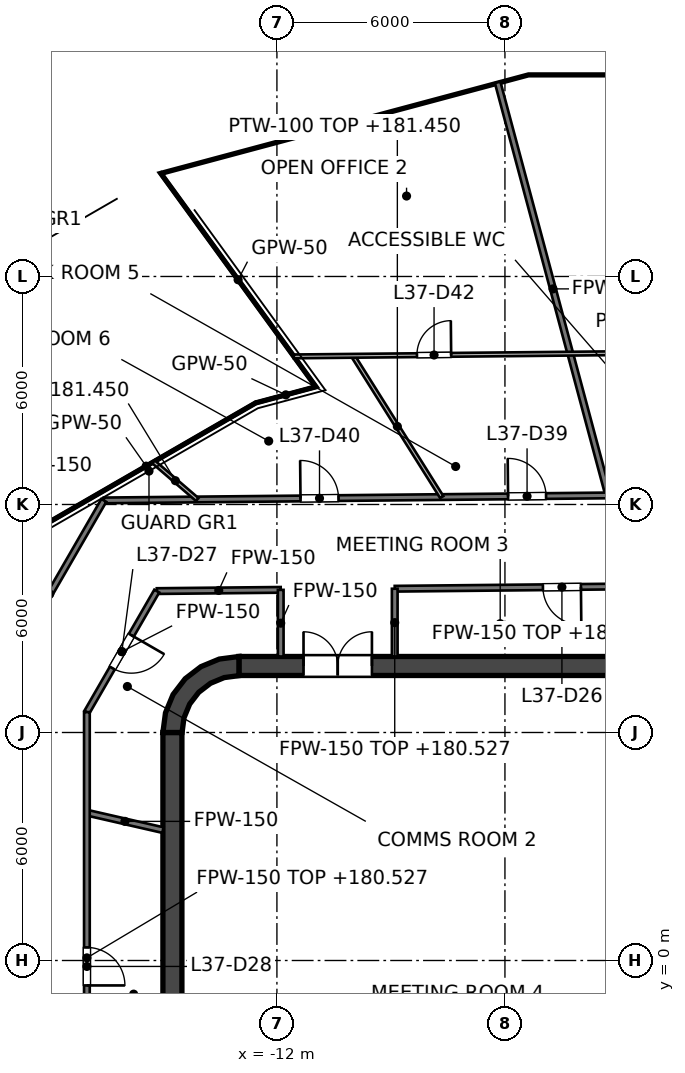
"""IFC4 building model, lengths in metres.
Left out: names, types, materials, properties, quantities, classifications, styles, units other than length and angle.
Written with IfcOpenShell. Run it as: python <this file> out.ifc"""

import sys

from ifc_helpers import new_model, si_unit, direction, frame, frame_2d, origin, place, context, subcontext, project, spatial, polyline, rectangle, outline, extrude, element, fill, save


model = new_model("IFC4")
c1 = context("Model", 3, precision=1e-05, world=origin(), true_north=direction((0.0, 1.0)))
c2 = subcontext(c1, "Body", "Model", "MODEL_VIEW")
j1 = project(units=[si_unit("LENGTHUNIT", "METRE"), si_unit("PLANEANGLEUNIT", "RADIAN")], contexts=[c1])
p1 = place(None, origin())
s1 = spatial("IfcSite", under=j1, at=p1, CompositionType="ELEMENT")
p2 = place(p1, origin())
s2 = spatial("IfcBuilding", under=s1, at=p2, CompositionType="ELEMENT")
p3 = place(p2, frame((0.0, 0.0, 177.6)))
s3 = spatial("IfcBuildingStorey", under=s2, at=p3, CompositionType="ELEMENT", Elevation=177.6)
p4 = place(p3, frame((-13.0, 7.75, 0.0), z_axis=(0.0, 0.0, 1.0), x_axis=(1.0, 0.0, 0.0)))
e1 = element("IfcWall", 1, at=p4, inside=s3, PredefinedType="SHEAR", context=c2, shape_type="SweptSolid", body=[
    extrude(rectangle(XDim=26.0, YDim=0.5, at=frame_2d((13.0, 0.0))), origin(), (0.0, 0.0, 1.0), 4.0),
])
p5 = place(p4, frame((1.7, 0.0, 0.0)))
e2 = element("IfcOpeningElement", 2, at=p5, cuts=e1, PredefinedType="OPENING", context=c2, shape_type="SweptSolid", body=[
    extrude(rectangle(XDim=1.8, YDim=2.1, at=frame_2d((0.9, 1.05))), frame((0.0, 0.25, 0.0), z_axis=(0.0, -1.0, 0.0), x_axis=(1.0, 0.0, 0.0)), (0.0, 0.0, 1.0), 0.5),
])
p6 = place(p4, frame((22.5, 0.0, 0.0)))
e3 = element("IfcOpeningElement", 3, at=p6, cuts=e1, PredefinedType="OPENING", context=c2, shape_type="SweptSolid", body=[
    extrude(rectangle(XDim=1.8, YDim=2.1, at=frame_2d((0.9, 1.05))), frame((0.0, 0.25, 0.0), z_axis=(0.0, -1.0, 0.0), x_axis=(1.0, 0.0, 0.0)), (0.0, 0.0, 1.0), 0.5),
])
p7 = place(p3, frame((-14.75, -6.0, 0.0), z_axis=(0.0, 0.0, 1.0), x_axis=(0.0, 1.0, 0.0)))
e4 = element("IfcWall", 4, at=p7, inside=s3, PredefinedType="SHEAR", context=c2, shape_type="SweptSolid", body=[
    extrude(rectangle(XDim=12.0, YDim=0.5, at=frame_2d((6.0, 0.0))), origin(), (0.0, 0.0, 1.0), 4.0),
])
p8 = place(p3, origin())
e5 = element("IfcWall", 5, at=p8, inside=s3, PredefinedType="SHEAR", context=c2, shape_type="SweptSolid", body=[
    extrude(outline(polyline([(-15.0, 6.0), (-14.496, 6.0), (-14.445, 6.387), (-14.295, 6.748), (-14.058, 7.058), (-13.748, 7.295), (-13.387, 7.445), (-13.0, 7.496), (-13.0, 8.0), (-13.518, 7.932), (-14.0, 7.732), (-14.414, 7.414), (-14.732, 7.0), (-14.932, 6.518), (-15.0, 6.0)])), origin(), (0.0, 0.0, 1.0), 4.0),
])
p9 = place(p3, frame((-9.0, 4.1, 0.0), z_axis=(0.0, 0.0, 1.0), x_axis=(0.0, 1.0, 0.0)))
e6 = element("IfcWall", 6, at=p9, inside=s3, PredefinedType="SOLIDWALL", context=c2, shape_type="SweptSolid", body=[
    extrude(rectangle(XDim=2.5, YDim=0.25, at=frame_2d((1.25, 0.0))), origin(), (0.0, 0.0, 1.0), 3.85),
])
p10 = place(p9, frame((0.65, 0.0, 0.0)))
e7 = element("IfcOpeningElement", 7, at=p10, cuts=e6, PredefinedType="OPENING", context=c2, shape_type="SweptSolid", body=[
    extrude(rectangle(XDim=1.2, YDim=2.1, at=frame_2d((0.6, 1.05))), frame((0.0, 0.125, 0.0), z_axis=(0.0, -1.0, 0.0), x_axis=(1.0, 0.0, 0.0)), (0.0, 0.0, 1.0), 0.25),
])
p11 = place(p3, frame((-9.125, 7.05, 0.0), z_axis=(0.0, 0.0, 1.0), x_axis=(1.0, 0.0, 0.0)))
e8 = element("IfcWall", 8, at=p11, inside=s3, PredefinedType="SOLIDWALL", context=c2, shape_type="SweptSolid", body=[
    extrude(rectangle(XDim=18.25, YDim=0.9, at=frame_2d((9.125, 0.0))), origin(), (0.0, 0.0, 1.0), 3.85),
])
p12 = place(p3, frame((-9.125, 1.525, 0.0), z_axis=(0.0, 0.0, 1.0), x_axis=(1.0, 0.0, 0.0)))
e9 = element("IfcWall", 9, at=p12, inside=s3, PredefinedType="PARTITIONING", context=c2, shape_type="SweptSolid", body=[
    extrude(rectangle(XDim=8.35, YDim=0.25, at=frame_2d((4.175, 0.0))), origin(), (0.0, 0.0, 1.0), 3.85),
])
p13 = place(p12, frame((1.363, 0.0, 0.0)))
e10 = element("IfcOpeningElement", 10, at=p13, cuts=e9, PredefinedType="OPENING", context=c2, shape_type="SweptSolid", body=[
    extrude(rectangle(XDim=1.0, YDim=2.1, at=frame_2d((0.5, 1.05))), frame((0.0, 0.125, 0.0), z_axis=(0.0, -1.0, 0.0), x_axis=(1.0, 0.0, 0.0)), (0.0, 0.0, 1.0), 0.25),
])
p14 = place(p12, frame((5.337, 0.0, 0.0)))
e11 = element("IfcOpeningElement", 11, at=p14, cuts=e9, PredefinedType="OPENING", context=c2, shape_type="SweptSolid", body=[
    extrude(rectangle(XDim=1.0, YDim=2.1, at=frame_2d((0.5, 1.05))), frame((0.0, 0.125, 0.0), z_axis=(0.0, -1.0, 0.0), x_axis=(1.0, 0.0, 0.0)), (0.0, 0.0, 1.0), 0.25),
])
p15 = place(p3, frame((-9.125, 3.975, 0.0), z_axis=(0.0, 0.0, 1.0), x_axis=(1.0, 0.0, 0.0)))
e12 = element("IfcWall", 12, at=p15, inside=s3, PredefinedType="SOLIDWALL", context=c2, shape_type="SweptSolid", body=[
    extrude(rectangle(XDim=8.35, YDim=0.25, at=frame_2d((4.175, 0.0))), origin(), (0.0, 0.0, 1.0), 3.85),
])
p16 = place(p3, frame((-9.0, 1.65, 0.0), z_axis=(0.0, 0.0, 1.0), x_axis=(0.0, 1.0, 0.0)))
e13 = element("IfcWall", 13, at=p16, inside=s3, PredefinedType="PARTITIONING", context=c2, shape_type="SweptSolid", body=[
    extrude(rectangle(XDim=2.2, YDim=0.25, at=frame_2d((1.1, 0.0))), origin(), (0.0, 0.0, 1.0), 3.85),
])
p17 = place(p3, frame((-5.6, 1.65, 0.0), z_axis=(0.0, 0.0, 1.0), x_axis=(0.0, 1.0, 0.0)))
e14 = element("IfcWall", 14, at=p17, inside=s3, PredefinedType="PARTITIONING", context=c2, shape_type="SweptSolid", body=[
    extrude(rectangle(XDim=2.2, YDim=0.1, at=frame_2d((1.1, 0.0))), origin(), (0.0, 0.0, 1.0), 3.85),
])
p18 = place(p3, frame((-11.8, -7.5, 0.0), z_axis=(0.0, 0.0, 1.0), x_axis=(0.0, 1.0, 0.0)))
e15 = element("IfcWall", 15, at=p18, inside=s3, PredefinedType="SOLIDWALL", context=c2, shape_type="SweptSolid", body=[
    extrude(rectangle(XDim=15.0, YDim=0.4, at=frame_2d((7.5, 0.0))), origin(), (0.0, 0.0, 1.0), 3.85),
])
p19 = place(p18, frame((11.3, 0.0, 0.0)))
e16 = element("IfcOpeningElement", 16, at=p19, cuts=e15, PredefinedType="OPENING", context=c2, shape_type="SweptSolid", body=[
    extrude(rectangle(XDim=1.1, YDim=2.1, at=frame_2d((0.55, 1.05))), frame((0.0, 0.2, 0.0), z_axis=(0.0, -1.0, 0.0), x_axis=(1.0, 0.0, 0.0)), (0.0, 0.0, 1.0), 0.4),
])
p20 = place(p18, frame((8.4, 0.0, 0.0)))
e17 = element("IfcOpeningElement", 17, at=p20, cuts=e15, PredefinedType="OPENING", context=c2, shape_type="SweptSolid", body=[
    extrude(rectangle(XDim=1.1, YDim=2.1, at=frame_2d((0.55, 1.05))), frame((0.0, 0.2, 0.0), z_axis=(0.0, -1.0, 0.0), x_axis=(1.0, 0.0, 0.0)), (0.0, 0.0, 1.0), 0.4),
])
p21 = place(p18, frame((5.5, 0.0, 0.0)))
e18 = element("IfcOpeningElement", 18, at=p21, cuts=e15, PredefinedType="OPENING", context=c2, shape_type="SweptSolid", body=[
    extrude(rectangle(XDim=1.1, YDim=2.1, at=frame_2d((0.55, 1.05))), frame((0.0, 0.2, 0.0), z_axis=(0.0, -1.0, 0.0), x_axis=(1.0, 0.0, 0.0)), (0.0, 0.0, 1.0), 0.4),
])
p22 = place(p18, frame((13.697, 0.0, 0.0)))
e19 = element("IfcOpeningElement", 19, at=p22, cuts=e15, PredefinedType="OPENING", context=c2, shape_type="SweptSolid", body=[
    extrude(rectangle(XDim=0.9, YDim=2.1, at=frame_2d((0.45, 1.05))), frame((0.0, 0.2, 0.0), z_axis=(0.0, -1.0, 0.0), x_axis=(1.0, 0.0, 0.0)), (0.0, 0.0, 1.0), 0.4),
])
p23 = place(p18, frame((0.403, 0.0, 0.0)))
e20 = element("IfcOpeningElement", 20, at=p23, cuts=e15, PredefinedType="OPENING", context=c2, shape_type="SweptSolid", body=[
    extrude(rectangle(XDim=0.9, YDim=2.1, at=frame_2d((0.45, 1.05))), frame((0.0, 0.2, 0.0), z_axis=(0.0, -1.0, 0.0), x_axis=(1.0, 0.0, 0.0)), (0.0, 0.0, 1.0), 0.4),
])
e21 = element("IfcWall", 21, at=p8, inside=s3, PredefinedType="SOLIDWALL", context=c2, shape_type="SweptSolid", body=[
    extrude(outline(polyline([(-12.0, -5.925), (-12.0, -5.675), (-14.25, -5.675), (-14.25, -3.025), (-12.0, -3.025), (-12.0, -2.775), (-14.25, -2.775), (-14.25, -0.125), (-12.0, -0.125), (-12.0, 0.125), (-14.25, 0.125), (-14.25, 2.775), (-12.0, 2.775), (-12.0, 3.025), (-14.25, 3.025), (-14.25, 5.675), (-12.0, 5.675), (-12.0, 5.925), (-14.25, 5.925), (-14.5, 5.925), (-14.5, 5.675), (-14.5, 3.025), (-14.5, 2.775), (-14.5, 0.125), (-14.5, -0.125), (-14.5, -2.775), (-14.5, -3.025), (-14.5, -5.675), (-14.5, -5.925), (-14.25, -5.925), (-12.0, -5.925)])), origin(), (0.0, 0.0, 1.0), 3.85),
])
p24 = place(p3, frame((-6.192, 23.108, 0.0), z_axis=(0.0, 0.0, 1.0), x_axis=(0.258761752607, -0.965941175946, 0.0)))
e22 = element("IfcWall", 22, at=p24, inside=s3, PredefinedType="PARTITIONING", context=c2, shape_type="SweptSolid", body=[
    extrude(rectangle(XDim=11.252, YDim=0.15, at=frame_2d((5.626, 0.0))), origin(), (0.0, 0.0, 1.0), 3.302),
])
p25 = place(p3, frame((-17.0, 3.89, 0.0), z_axis=(0.0, 0.0, 1.0), x_axis=(0.974792736312, -0.223112351146, 0.0)))
e23 = element("IfcWall", 23, at=p25, inside=s3, PredefinedType="PARTITIONING", context=c2, shape_type="SweptSolid", body=[
    extrude(rectangle(XDim=2.052, YDim=0.15, at=frame_2d((1.026, 0.0))), origin(), (0.0, 0.0, 1.0), 2.995),
])
p26 = place(p3, frame((-15.161, 9.721, 0.0), z_axis=(0.0, 0.0, 1.0), x_axis=(0.999950429518, 0.009956832157, 0.0)))
e24 = element("IfcWall", 24, at=p26, inside=s3, PredefinedType="PARTITIONING", context=c2, shape_type="SweptSolid", body=[
    extrude(rectangle(XDim=3.261, YDim=0.15, at=frame_2d((1.631, 0.0))), origin(), (0.0, 0.0, 1.0), 2.995),
])
p27 = place(p3, frame((-8.9, 9.783, 0.0), z_axis=(0.0, 0.0, 1.0), x_axis=(0.999950969978, 0.009902405776, 0.0)))
e25 = element("IfcWall", 25, at=p27, inside=s3, PredefinedType="PARTITIONING", context=c2, shape_type="SweptSolid", body=[
    extrude(rectangle(XDim=17.801, YDim=0.15, at=frame_2d((8.9, 0.0))), origin(), (0.0, 0.0, 1.0), 2.927),
])
p28 = place(p27, frame((12.801, 0.0, 0.0)))
e26 = element("IfcOpeningElement", 26, at=p28, cuts=e25, PredefinedType="OPENING", context=c2, shape_type="SweptSolid", body=[
    extrude(rectangle(XDim=1.0, YDim=2.1, at=frame_2d((0.5, 1.05))), frame((0.0, 0.075, 0.0), z_axis=(0.0, -1.0, 0.0), x_axis=(1.0, 0.0, 0.0)), (0.0, 0.0, 1.0), 0.15),
])
p29 = place(p27, frame((3.9, 0.0, 0.0)))
e27 = element("IfcOpeningElement", 27, at=p29, cuts=e25, PredefinedType="OPENING", context=c2, shape_type="SweptSolid", body=[
    extrude(rectangle(XDim=1.0, YDim=2.1, at=frame_2d((0.5, 1.05))), frame((0.0, 0.075, 0.0), z_axis=(0.0, -1.0, 0.0), x_axis=(1.0, 0.0, 0.0)), (0.0, 0.0, 1.0), 0.15),
])
p30 = place(p3, frame((-16.555, 12.107, 0.0), z_axis=(0.0, 0.0, 1.0), x_axis=(0.999951034758, 0.009895862121, 0.0)))
e28 = element("IfcWall", 28, at=p30, inside=s3, PredefinedType="PARTITIONING", context=c2, shape_type="SweptSolid", body=[
    extrude(rectangle(XDim=30.715, YDim=0.15, at=frame_2d((15.358, 0.0))), origin(), (0.0, 0.0, 1.0), 2.927),
])
p31 = place(p30, frame((20.689, 0.0, 0.0)))
e29 = element("IfcOpeningElement", 29, at=p31, cuts=e28, PredefinedType="OPENING", context=c2, shape_type="SweptSolid", body=[
    extrude(rectangle(XDim=1.0, YDim=2.1, at=frame_2d((0.5, 1.05))), frame((0.0, 0.075, 0.0), z_axis=(0.0, -1.0, 0.0), x_axis=(1.0, 0.0, 0.0)), (0.0, 0.0, 1.0), 0.15),
])
p32 = place(p30, frame((14.115, 0.0, 0.0)))
e30 = element("IfcOpeningElement", 30, at=p32, cuts=e28, PredefinedType="OPENING", context=c2, shape_type="SweptSolid", body=[
    extrude(rectangle(XDim=1.0, YDim=2.1, at=frame_2d((0.5, 1.05))), frame((0.0, 0.075, 0.0), z_axis=(0.0, -1.0, 0.0), x_axis=(1.0, 0.0, 0.0)), (0.0, 0.0, 1.0), 0.15),
])
p33 = place(p30, frame((10.638, 0.0, 0.0)))
e31 = element("IfcOpeningElement", 31, at=p33, cuts=e28, PredefinedType="OPENING", context=c2, shape_type="SweptSolid", body=[
    extrude(rectangle(XDim=1.0, YDim=2.1, at=frame_2d((0.5, 1.05))), frame((0.0, 0.075, 0.0), z_axis=(0.0, -1.0, 0.0), x_axis=(1.0, 0.0, 0.0)), (0.0, 0.0, 1.0), 0.15),
])
p34 = place(p30, frame((5.176, 0.0, 0.0)))
e32 = element("IfcOpeningElement", 32, at=p34, cuts=e28, PredefinedType="OPENING", context=c2, shape_type="SweptSolid", body=[
    extrude(rectangle(XDim=1.0, YDim=2.1, at=frame_2d((0.5, 1.05))), frame((0.0, 0.075, 0.0), z_axis=(0.0, -1.0, 0.0), x_axis=(1.0, 0.0, 0.0)), (0.0, 0.0, 1.0), 0.15),
])
p35 = place(p3, frame((-17.0, 6.536, 0.0), z_axis=(0.0, 0.0, 1.0), x_axis=(0.499965700209, 0.866045205872, 0.0)))
e33 = element("IfcWall", 33, at=p35, inside=s3, PredefinedType="PARTITIONING", context=c2, shape_type="SweptSolid", body=[
    extrude(rectangle(XDim=3.678, YDim=0.15, at=frame_2d((1.839, 0.0))), origin(), (0.0, 0.0, 1.0), 2.995),
])
p36 = place(p35, frame((1.338, 0.0, 0.0)))
e34 = element("IfcOpeningElement", 34, at=p36, cuts=e33, PredefinedType="OPENING", context=c2, shape_type="SweptSolid", body=[
    extrude(rectangle(XDim=1.0, YDim=2.1, at=frame_2d((0.5, 1.05))), frame((0.0, 0.075, 0.0), z_axis=(0.0, -1.0, 0.0), x_axis=(1.0, 0.0, 0.0)), (0.0, 0.0, 1.0), 0.15),
])
p37 = place(p3, frame((-19.4, 7.179, 0.0), z_axis=(0.0, 0.0, 1.0), x_axis=(0.499973768087, 0.866040548257, 0.0)))
e35 = element("IfcWall", 35, at=p37, inside=s3, PredefinedType="PARTITIONING", context=c2, shape_type="SweptSolid", body=[
    extrude(rectangle(XDim=5.69, YDim=0.15, at=frame_2d((2.845, 0.0))), origin(), (0.0, 0.0, 1.0), 2.995),
])
p38 = place(p37, frame((1.73, 0.0, 0.0)))
e36 = element("IfcOpeningElement", 36, at=p38, cuts=e35, PredefinedType="OPENING", context=c2, shape_type="SweptSolid", body=[
    extrude(rectangle(XDim=1.0, YDim=2.1, at=frame_2d((0.5, 1.05))), frame((0.0, 0.075, 0.0), z_axis=(0.0, -1.0, 0.0), x_axis=(1.0, 0.0, 0.0)), (0.0, 0.0, 1.0), 0.15),
])
p39 = place(p3, frame((-8.9, 8.0, 0.0), z_axis=(0.0, 0.0, 1.0), x_axis=(0.0, 1.0, 0.0)))
e37 = element("IfcWall", 37, at=p39, inside=s3, PredefinedType="PARTITIONING", context=c2, shape_type="SweptSolid", body=[
    extrude(rectangle(XDim=1.783, YDim=0.15, at=frame_2d((0.892, 0.0))), origin(), (0.0, 0.0, 1.0), 2.927),
])
p40 = place(p3, frame((-11.9, 8.0, 0.0), z_axis=(0.0, 0.0, 1.0), x_axis=(0.0, 1.0, 0.0)))
e38 = element("IfcWall", 38, at=p40, inside=s3, PredefinedType="PARTITIONING", context=c2, shape_type="SweptSolid", body=[
    extrude(rectangle(XDim=1.753, YDim=0.15, at=frame_2d((0.876, 0.0))), origin(), (0.0, 0.0, 1.0), 2.995),
])
p41 = place(p3, frame((-17.0, -6.398, 0.0), z_axis=(0.0, 0.0, 1.0), x_axis=(0.0, 1.0, 0.0)))
e39 = element("IfcWall", 39, at=p41, inside=s3, PredefinedType="PARTITIONING", context=c2, shape_type="SweptSolid", body=[
    extrude(rectangle(XDim=12.934, YDim=0.15, at=frame_2d((6.467, 0.0))), origin(), (0.0, 0.0, 1.0), 2.927),
])
p42 = place(p41, frame((5.742, 0.0, 0.0)))
e40 = element("IfcOpeningElement", 40, at=p42, cuts=e39, PredefinedType="OPENING", context=c2, shape_type="SweptSolid", body=[
    extrude(rectangle(XDim=1.0, YDim=2.1, at=frame_2d((0.5, 1.05))), frame((0.0, 0.075, 0.0), z_axis=(0.0, -1.0, 0.0), x_axis=(1.0, 0.0, 0.0)), (0.0, 0.0, 1.0), 0.15),
])
p43 = place(p3, frame((-15.068, 20.73, 0.0), z_axis=(0.0, 0.0, 1.0), x_axis=(0.587950705029, -0.808896760073, 0.0)))
e41 = element("IfcWall", 41, at=p43, inside=s3, PredefinedType="PARTITIONING", context=c2, shape_type="SweptSolid", body=[
    extrude(rectangle(XDim=6.964, YDim=0.05, at=frame_2d((3.482, 0.0))), origin(), (0.0, 0.0, 1.0), 2.927),
])
p44 = place(p3, frame((-12.559, 14.673, 0.0), z_axis=(0.0, 0.0, 1.0), x_axis=(0.966056881693, 0.25832944341, 0.0)))
e42 = element("IfcWall", 42, at=p44, inside=s3, PredefinedType="PARTITIONING", context=c2, shape_type="SweptSolid", body=[
    extrude(rectangle(XDim=1.641, YDim=0.05, at=frame_2d((0.82, 0.0))), origin(), (0.0, 0.0, 1.0), 2.927),
])
p45 = place(p3, frame((-18.323, 11.345, 0.0), z_axis=(0.0, 0.0, 1.0), x_axis=(0.866004159061, 0.500036795134, 0.0)))
e43 = element("IfcWall", 43, at=p45, inside=s3, PredefinedType="PARTITIONING", context=c2, shape_type="SweptSolid", body=[
    extrude(rectangle(XDim=6.656, YDim=0.05, at=frame_2d((3.328, 0.0))), origin(), (0.0, 0.0, 1.0), 2.927),
])
p46 = place(p3, frame((-9.999, 15.912, 0.0), z_axis=(0.0, 0.0, 1.0), x_axis=(0.532091818794, -0.846686657727, 0.0)))
e44 = element("IfcWall", 44, at=p46, inside=s3, PredefinedType="PARTITIONING", context=c2, shape_type="SweptSolid", body=[
    extrude(rectangle(XDim=4.39, YDim=0.1, at=frame_2d((2.195, 0.0))), origin(), (0.0, 0.0, 1.0), 3.85),
])
p47 = place(p3, frame((-15.247, 13.121, 0.0), z_axis=(0.0, 0.0, 1.0), x_axis=(0.757903577164, -0.65236658998, 0.0)))
e45 = element("IfcWall", 45, at=p47, inside=s3, PredefinedType="PARTITIONING", context=c2, shape_type="SweptSolid", body=[
    extrude(rectangle(XDim=1.518, YDim=0.1, at=frame_2d((0.759, 0.0))), origin(), (0.0, 0.0, 1.0), 3.85),
])
p48 = place(p3, frame((-11.555, 15.897, 0.0), z_axis=(0.0, 0.0, 1.0), x_axis=(0.999951328792, 0.009866105979, 0.0)))
e46 = element("IfcWall", 46, at=p48, inside=s3, PredefinedType="PARTITIONING", context=c2, shape_type="SweptSolid", body=[
    extrude(rectangle(XDim=26.7, YDim=0.1, at=frame_2d((13.35, 0.0))), origin(), (0.0, 0.0, 1.0), 2.927),
])
p49 = place(p48, frame((16.09, 0.0, 0.0)))
e47 = element("IfcOpeningElement", 47, at=p49, cuts=e46, PredefinedType="OPENING", context=c2, shape_type="SweptSolid", body=[
    extrude(rectangle(XDim=1.8, YDim=2.1, at=frame_2d((0.9, 1.05))), frame((0.0, 0.05, 0.0), z_axis=(0.0, -1.0, 0.0), x_axis=(1.0, 0.0, 0.0)), (0.0, 0.0, 1.0), 0.1),
])
p50 = place(p48, frame((3.24, 0.0, 0.0)))
e48 = element("IfcOpeningElement", 48, at=p50, cuts=e46, PredefinedType="OPENING", context=c2, shape_type="SweptSolid", body=[
    extrude(rectangle(XDim=0.9, YDim=2.1, at=frame_2d((0.45, 1.05))), frame((0.0, 0.05, 0.0), z_axis=(0.0, -1.0, 0.0), x_axis=(1.0, 0.0, 0.0)), (0.0, 0.0, 1.0), 0.1),
])
p51 = place(p19, origin())
e49 = element("IfcDoor", 49, at=p51, inside=s3, OperationType="DOUBLE_DOOR_SLIDING", PredefinedType="DOOR", context=c2, shape_type="SweptSolid", body=[
    extrude(rectangle(XDim=1.1, YDim=2.1, at=frame_2d((0.55, 1.05))), frame((0.0, 0.025, 0.0), z_axis=(0.0, -1.0, 0.0), x_axis=(1.0, 0.0, 0.0)), (0.0, 0.0, 1.0), 0.05),
])
fill(e16, e49)
p52 = place(p20, origin())
e50 = element("IfcDoor", 50, at=p52, inside=s3, OperationType="DOUBLE_DOOR_SLIDING", PredefinedType="DOOR", context=c2, shape_type="SweptSolid", body=[
    extrude(rectangle(XDim=1.1, YDim=2.1, at=frame_2d((0.55, 1.05))), frame((0.0, 0.025, 0.0), z_axis=(0.0, -1.0, 0.0), x_axis=(1.0, 0.0, 0.0)), (0.0, 0.0, 1.0), 0.05),
])
fill(e17, e50)
p53 = place(p10, origin())
e51 = element("IfcDoor", 51, at=p53, inside=s3, OperationType="SINGLE_SWING_RIGHT", PredefinedType="DOOR", context=c2, shape_type="SweptSolid", body=[
    extrude(rectangle(XDim=1.2, YDim=2.1, at=frame_2d((0.6, 1.05))), frame((0.0, 0.025, 0.0), z_axis=(0.0, -1.0, 0.0), x_axis=(1.0, 0.0, 0.0)), (0.0, 0.0, 1.0), 0.05),
])
fill(e7, e51)
p54 = place(p13, origin())
e52 = element("IfcDoor", 52, at=p54, inside=s3, OperationType="SINGLE_SWING_LEFT", PredefinedType="DOOR", context=c2, shape_type="SweptSolid", body=[
    extrude(rectangle(XDim=1.0, YDim=2.1, at=frame_2d((0.5, 1.05))), frame((0.0, 0.025, 0.0), z_axis=(0.0, -1.0, 0.0), x_axis=(1.0, 0.0, 0.0)), (0.0, 0.0, 1.0), 0.05),
])
fill(e10, e52)
p55 = place(p14, origin())
e53 = element("IfcDoor", 53, at=p55, inside=s3, OperationType="SINGLE_SWING_LEFT", PredefinedType="DOOR", context=c2, shape_type="SweptSolid", body=[
    extrude(rectangle(XDim=1.0, YDim=2.1, at=frame_2d((0.5, 1.05))), frame((0.0, 0.025, 0.0), z_axis=(0.0, -1.0, 0.0), x_axis=(1.0, 0.0, 0.0)), (0.0, 0.0, 1.0), 0.05),
])
fill(e11, e53)
p56 = place(p22, origin())
e54 = element("IfcDoor", 54, at=p56, inside=s3, OperationType="SINGLE_SWING_LEFT", PredefinedType="DOOR", context=c2, shape_type="SweptSolid", body=[
    extrude(rectangle(XDim=0.9, YDim=2.1, at=frame_2d((0.45, 1.05))), frame((0.0, 0.025, 0.0), z_axis=(0.0, -1.0, 0.0), x_axis=(1.0, 0.0, 0.0)), (0.0, 0.0, 1.0), 0.05),
])
fill(e19, e54)
p57 = place(p5, origin())
e55 = element("IfcDoor", 55, at=p57, inside=s3, OperationType="DOUBLE_DOOR_SINGLE_SWING", PredefinedType="DOOR", context=c2, shape_type="SweptSolid", body=[
    extrude(rectangle(XDim=1.8, YDim=2.1, at=frame_2d((0.9, 1.05))), frame((0.0, 0.025, 0.0), z_axis=(0.0, -1.0, 0.0), x_axis=(1.0, 0.0, 0.0)), (0.0, 0.0, 1.0), 0.05),
])
fill(e2, e55)
p58 = place(p29, origin())
e56 = element("IfcDoor", 56, at=p58, inside=s3, OperationType="SINGLE_SWING_RIGHT", PredefinedType="DOOR", context=c2, shape_type="SweptSolid", body=[
    extrude(rectangle(XDim=1.0, YDim=2.1, at=frame_2d((0.5, 1.05))), frame((0.0, 0.025, 0.0), z_axis=(0.0, -1.0, 0.0), x_axis=(1.0, 0.0, 0.0)), (0.0, 0.0, 1.0), 0.05),
])
fill(e27, e56)
p59 = place(p36, origin())
e57 = element("IfcDoor", 57, at=p59, inside=s3, OperationType="SINGLE_SWING_RIGHT", PredefinedType="DOOR", context=c2, shape_type="SweptSolid", body=[
    extrude(rectangle(XDim=1.0, YDim=2.1, at=frame_2d((0.5, 1.05))), frame((0.0, 0.025, 0.0), z_axis=(0.0, -1.0, 0.0), x_axis=(1.0, 0.0, 0.0)), (0.0, 0.0, 1.0), 0.05),
])
fill(e34, e57)
p60 = place(p42, origin())
e58 = element("IfcDoor", 58, at=p60, inside=s3, OperationType="SINGLE_SWING_LEFT", PredefinedType="DOOR", context=c2, shape_type="SweptSolid", body=[
    extrude(rectangle(XDim=1.0, YDim=2.1, at=frame_2d((0.5, 1.05))), frame((0.0, 0.025, 0.0), z_axis=(0.0, -1.0, 0.0), x_axis=(1.0, 0.0, 0.0)), (0.0, 0.0, 1.0), 0.05),
])
fill(e40, e58)
p61 = place(p33, origin())
e59 = element("IfcDoor", 59, at=p61, inside=s3, OperationType="SINGLE_SWING_LEFT", PredefinedType="DOOR", context=c2, shape_type="SweptSolid", body=[
    extrude(rectangle(XDim=1.0, YDim=2.1, at=frame_2d((0.5, 1.05))), frame((0.0, 0.025, 0.0), z_axis=(0.0, -1.0, 0.0), x_axis=(1.0, 0.0, 0.0)), (0.0, 0.0, 1.0), 0.05),
])
fill(e31, e59)
p62 = place(p34, origin())
e60 = element("IfcDoor", 60, at=p62, inside=s3, OperationType="SINGLE_SWING_LEFT", PredefinedType="DOOR", context=c2, shape_type="SweptSolid", body=[
    extrude(rectangle(XDim=1.0, YDim=2.1, at=frame_2d((0.5, 1.05))), frame((0.0, 0.025, 0.0), z_axis=(0.0, -1.0, 0.0), x_axis=(1.0, 0.0, 0.0)), (0.0, 0.0, 1.0), 0.05),
])
fill(e32, e60)
p63 = place(p50, origin())
e61 = element("IfcDoor", 61, at=p63, inside=s3, OperationType="SINGLE_SWING_RIGHT", PredefinedType="DOOR", context=c2, shape_type="SweptSolid", body=[
    extrude(rectangle(XDim=0.9, YDim=2.1, at=frame_2d((0.45, 1.05))), frame((0.0, 0.025, 0.0), z_axis=(0.0, -1.0, 0.0), x_axis=(1.0, 0.0, 0.0)), (0.0, 0.0, 1.0), 0.05),
])
fill(e48, e61)
save(model, sys.argv[1])
